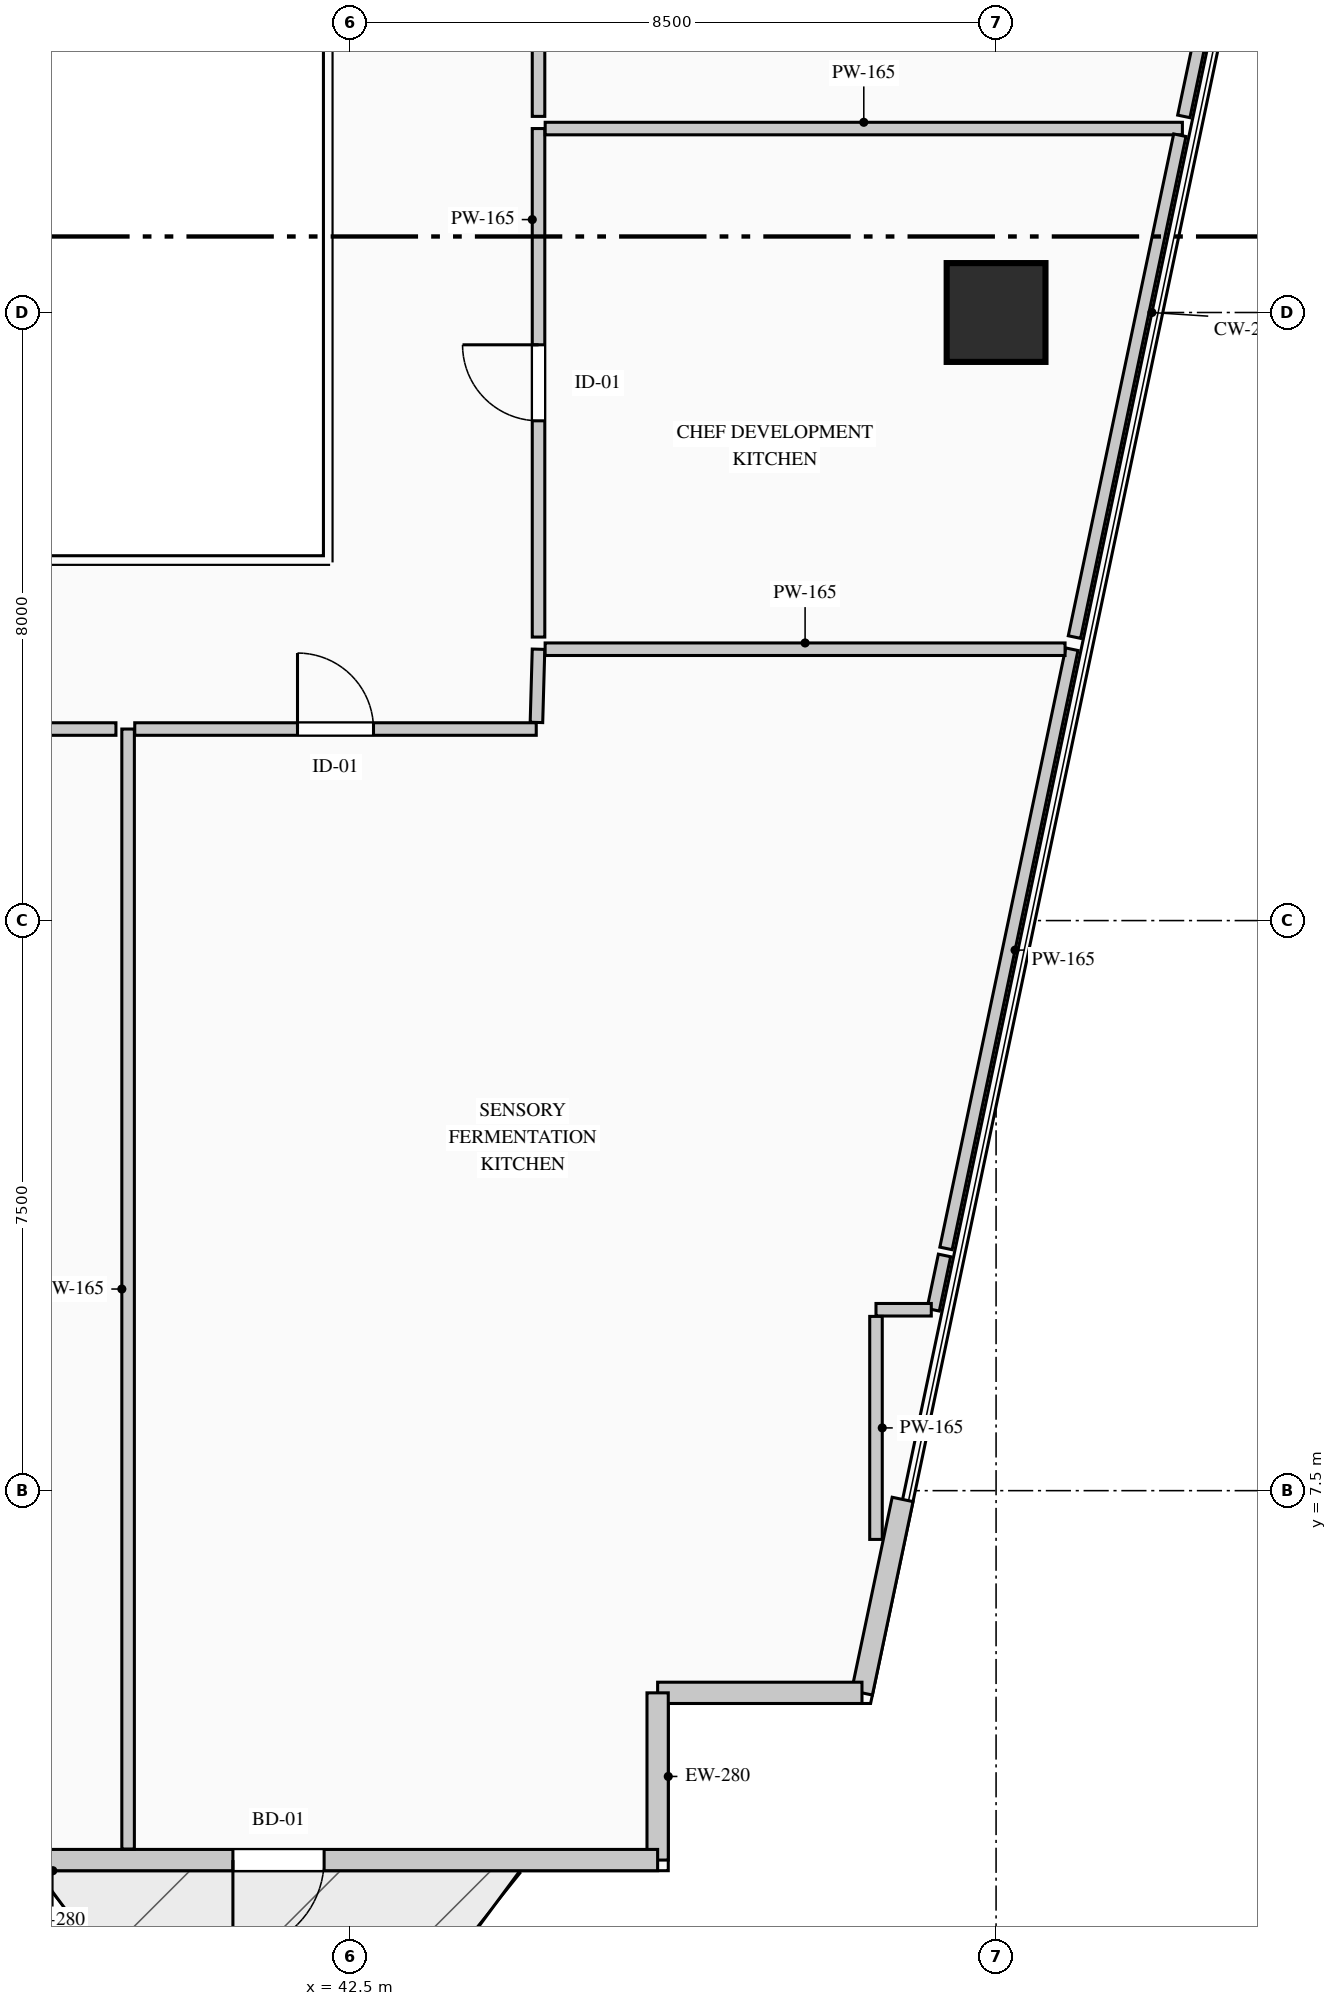
"""IFC4 building model, lengths in metres.
Left out: names, types, materials, properties, quantities, classifications, styles, units other than length and angle.
Written with IfcOpenShell. Run it as: python <this file> out.ifc"""

import sys

from ifc_helpers import new_model, si_unit, direction, frame, frame_2d, origin, origin_2d, place, context, subcontext, project, spatial, rectangle, extrude, element, fill, save


model = new_model("IFC4")
c1 = context("Model", 3, precision=1e-05, world=origin(), true_north=direction((0.0, 1.0)))
c2 = subcontext(c1, "Body", "Model", "MODEL_VIEW")
j1 = project(units=[si_unit("LENGTHUNIT", "METRE"), si_unit("PLANEANGLEUNIT", "RADIAN")], contexts=[c1])
p1 = place(None, origin())
s1 = spatial("IfcSite", under=j1, at=p1, CompositionType="ELEMENT")
p2 = place(p1, origin())
s2 = spatial("IfcBuilding", under=s1, at=p2, CompositionType="ELEMENT")
p3 = place(p2, frame((0.0, 0.0, 84.2)))
s3 = spatial("IfcBuildingStorey", under=s2, at=p3, CompositionType="ELEMENT", Elevation=84.2)
p4 = place(p3, frame((51.0, 23.0, 0.0), z_axis=(0.0, 0.0, 1.0), x_axis=(1.0, 0.0, 0.0)))
e1 = element("IfcColumn", 1, at=p4, inside=s3, PredefinedType="COLUMN", context=c2, shape_type="SweptSolid", body=[
    extrude(rectangle(XDim=1.3, YDim=1.3, at=origin_2d()), origin(), (0.0, 0.0, 1.0), 4.4),
])
p5 = place(p3, frame((49.77, 7.385, 0.0), z_axis=(0.0, 0.0, 1.0), x_axis=(-0.205551409765, -0.978646319128, 0.0)))
e2 = element("IfcWall", 2, at=p5, inside=s3, PredefinedType="STANDARD", context=c2, shape_type="SweptSolid", body=[
    extrude(rectangle(XDim=2.6, YDim=0.28, at=frame_2d((1.3, 0.0))), origin(), (0.0, 0.0, 1.0), 4.115),
])
p6 = place(p3, frame((49.236, 4.84, 0.0), z_axis=(0.0, 0.0, 1.0), x_axis=(-1.0, 0.0, 0.0)))
e3 = element("IfcWall", 3, at=p6, inside=s3, PredefinedType="STANDARD", context=c2, shape_type="SweptSolid", body=[
    extrude(rectangle(XDim=2.688, YDim=0.28, at=frame_2d((1.344, 0.0))), origin(), (0.0, 0.0, 1.0), 4.115),
])
p7 = place(p3, frame((46.547, 4.84, 0.0), z_axis=(0.0, 0.0, 1.0), x_axis=(0.0, -1.0, 0.0)))
e4 = element("IfcWall", 4, at=p7, inside=s3, PredefinedType="STANDARD", context=c2, shape_type="SweptSolid", body=[
    extrude(rectangle(XDim=2.2, YDim=0.28, at=frame_2d((1.1, 0.0))), origin(), (0.0, 0.0, 1.0), 4.115),
])
p8 = place(p3, frame((46.547, 2.64, 0.0), z_axis=(0.0, 0.0, 1.0), x_axis=(-1.0, 0.0, 0.0)))
e5 = element("IfcWall", 5, at=p8, inside=s3, PredefinedType="STANDARD", context=c2, shape_type="SweptSolid", body=[
    extrude(rectangle(XDim=9.977, YDim=0.28, at=frame_2d((4.989, 0.0))), origin(), (0.0, 0.0, 1.0), 4.115),
])
p9 = place(p8, frame((4.388, 0.0, 0.0)))
e6 = element("IfcOpeningElement", 6, at=p9, cuts=e5, PredefinedType="OPENING", context=c2, shape_type="SweptSolid", body=[
    extrude(rectangle(XDim=1.2, YDim=2.2, at=frame_2d((0.6, 1.1))), frame((0.0, 0.15, 0.0), z_axis=(0.0, -1.0, 0.0), x_axis=(1.0, 0.0, 0.0)), (0.0, 0.0, 1.0), 0.3),
])
p10 = place(p3, frame((51.997, 18.57, 0.0), z_axis=(0.0, 0.0, 1.0), x_axis=(-0.205584289858, -0.978639412533, 0.0)))
e7 = element("IfcWall", 7, at=p10, inside=s3, PredefinedType="PARTITIONING", context=c2, shape_type="SweptSolid", body=[
    extrude(rectangle(XDim=8.055, YDim=0.165, at=frame_2d((4.028, 0.0))), origin(), (0.0, 0.0, 1.0), 4.115),
])
p11 = place(p3, frame((50.322, 10.594, 0.0), z_axis=(0.0, 0.0, 1.0), x_axis=(-0.204661980979, -0.978832709681, 0.0)))
e8 = element("IfcWall", 8, at=p11, inside=s3, PredefinedType="PARTITIONING", context=c2, shape_type="SweptSolid", body=[
    extrude(rectangle(XDim=0.73, YDim=0.165, at=frame_2d((0.365, 0.0))), origin(), (0.0, 0.0, 1.0), 4.115),
])
p12 = place(p3, frame((50.148, 9.88, 0.0), z_axis=(0.0, 0.0, 1.0), x_axis=(-1.0, 0.0, 0.0)))
e9 = element("IfcWall", 9, at=p12, inside=s3, PredefinedType="PARTITIONING", context=c2, shape_type="SweptSolid", body=[
    extrude(rectangle(XDim=0.728, YDim=0.165, at=frame_2d((0.364, 0.0))), origin(), (0.0, 0.0, 1.0), 4.115),
])
p13 = place(p3, frame((49.42, 9.792, 0.0), z_axis=(0.0, 0.0, 1.0), x_axis=(0.0, -1.0, 0.0)))
e10 = element("IfcWall", 10, at=p13, inside=s3, PredefinedType="PARTITIONING", context=c2, shape_type="SweptSolid", body=[
    extrude(rectangle(XDim=2.934, YDim=0.165, at=frame_2d((1.467, 0.0))), origin(), (0.0, 0.0, 1.0), 4.115),
])
p14 = place(p3, frame((39.58, 2.785, 0.0), z_axis=(0.0, 0.0, 1.0), x_axis=(0.0, 1.0, 0.0)))
e11 = element("IfcWall", 11, at=p14, inside=s3, PredefinedType="PARTITIONING", context=c2, shape_type="SweptSolid", body=[
    extrude(rectangle(XDim=14.735, YDim=0.165, at=frame_2d((7.368, 0.0))), origin(), (0.0, 0.0, 1.0), 4.115),
])
p15 = place(p3, frame((39.667, 17.52, 0.0), z_axis=(0.0, 0.0, 1.0), x_axis=(1.0, 0.0, 0.0)))
e12 = element("IfcWall", 12, at=p15, inside=s3, PredefinedType="PARTITIONING", context=c2, shape_type="SweptSolid", body=[
    extrude(rectangle(XDim=5.282, YDim=0.165, at=frame_2d((2.641, 0.0))), origin(), (0.0, 0.0, 1.0), 4.115),
])
p16 = place(p15, frame((2.141, 0.0, 0.0)))
e13 = element("IfcOpeningElement", 13, at=p16, cuts=e12, PredefinedType="OPENING", context=c2, shape_type="SweptSolid", body=[
    extrude(rectangle(XDim=1.0, YDim=2.15, at=frame_2d((0.5, 1.075))), frame((0.0, 0.093, 0.0), z_axis=(0.0, -1.0, 0.0), x_axis=(1.0, 0.0, 0.0)), (0.0, 0.0, 1.0), 0.185),
])
p17 = place(p3, frame((44.952, 17.607, 0.0), z_axis=(0.0, 0.0, 1.0), x_axis=(0.028624859452, 0.999590224753, 0.0)))
e14 = element("IfcWall", 14, at=p17, inside=s3, PredefinedType="PARTITIONING", context=c2, shape_type="SweptSolid", body=[
    extrude(rectangle(XDim=0.964, YDim=0.165, at=frame_2d((0.482, 0.0))), origin(), (0.0, 0.0, 1.0), 4.115),
])
p18 = place(p3, frame((45.067, 18.57, 0.0), z_axis=(0.0, 0.0, 1.0), x_axis=(1.0, 0.0, 0.0)))
e15 = element("IfcWall", 15, at=p18, inside=s3, PredefinedType="PARTITIONING", context=c2, shape_type="SweptSolid", body=[
    extrude(rectangle(XDim=6.841, YDim=0.165, at=frame_2d((3.42, 0.0))), origin(), (0.0, 0.0, 1.0), 4.115),
])
p19 = place(p3, frame((28.58, 17.52, 0.0), z_axis=(0.0, 0.0, 1.0), x_axis=(1.0, 0.0, 0.0)))
e16 = element("IfcWall", 16, at=p19, inside=s3, PredefinedType="PARTITIONING", context=c2, shape_type="SweptSolid", body=[
    extrude(rectangle(XDim=10.84, YDim=0.165, at=frame_2d((5.42, 0.0))), origin(), (0.0, 0.0, 1.0), 3.8),
])
p20 = place(p19, frame((4.92, 0.0, 0.0)))
e17 = element("IfcOpeningElement", 17, at=p20, cuts=e16, PredefinedType="OPENING", context=c2, shape_type="SweptSolid", body=[
    extrude(rectangle(XDim=1.0, YDim=2.15, at=frame_2d((0.5, 1.075))), frame((0.0, 0.093, 0.0), z_axis=(0.0, -1.0, 0.0), x_axis=(1.0, 0.0, 0.0)), (0.0, 0.0, 1.0), 0.185),
])
p21 = place(p3, frame((44.98, 18.73, 0.0), z_axis=(0.0, 0.0, 1.0), x_axis=(0.0, 1.0, 0.0)))
e18 = element("IfcWall", 18, at=p21, inside=s3, PredefinedType="PARTITIONING", context=c2, shape_type="SweptSolid", body=[
    extrude(rectangle(XDim=6.69, YDim=0.165, at=frame_2d((3.345, 0.0))), origin(), (0.0, 0.0, 1.0), 4.115),
])
p22 = place(p21, frame((2.845, 0.0, 0.0)))
e19 = element("IfcOpeningElement", 19, at=p22, cuts=e18, PredefinedType="OPENING", context=c2, shape_type="SweptSolid", body=[
    extrude(rectangle(XDim=1.0, YDim=2.15, at=frame_2d((0.5, 1.075))), frame((0.0, 0.093, 0.0), z_axis=(0.0, -1.0, 0.0), x_axis=(1.0, 0.0, 0.0)), (0.0, 0.0, 1.0), 0.185),
])
p23 = place(p3, frame((45.067, 25.42, 0.0), z_axis=(0.0, 0.0, 1.0), x_axis=(1.0, 0.0, 0.0)))
e20 = element("IfcWall", 20, at=p23, inside=s3, PredefinedType="PARTITIONING", context=c2, shape_type="SweptSolid", body=[
    extrude(rectangle(XDim=8.384, YDim=0.165, at=frame_2d((4.192, 0.0))), origin(), (0.0, 0.0, 1.0), 4.115),
])
p24 = place(p3, frame((53.417, 25.333, 0.0), z_axis=(0.0, 0.0, 1.0), x_axis=(-0.205508916106, -0.978655243383, 0.0)))
e21 = element("IfcWall", 21, at=p24, inside=s3, PredefinedType="PARTITIONING", context=c2, shape_type="SweptSolid", body=[
    extrude(rectangle(XDim=6.747, YDim=0.165, at=frame_2d((3.373, 0.0))), origin(), (0.0, 0.0, 1.0), 4.115),
])
p25 = place(p3, frame((56.194, 38.548, 0.0), z_axis=(0.0, 0.0, 1.0), x_axis=(-0.205602819639, -0.978635519771, 0.0)))
e22 = element("IfcWall", 22, at=p25, inside=s3, PredefinedType="PARTITIONING", context=c2, shape_type="SweptSolid", body=[
    extrude(rectangle(XDim=13.251, YDim=0.165, at=frame_2d((6.625, 0.0))), origin(), (0.0, 0.0, 1.0), 4.115),
])
p26 = place(p3, frame((44.98, 25.58, 0.0), z_axis=(0.0, 0.0, 1.0), x_axis=(0.0, 1.0, 0.0)))
e23 = element("IfcWall", 23, at=p26, inside=s3, PredefinedType="PARTITIONING", context=c2, shape_type="SweptSolid", body=[
    extrude(rectangle(XDim=8.45, YDim=0.165, at=frame_2d((4.225, 0.0))), origin(), (0.0, 0.0, 1.0), 3.8),
])
p27 = place(p26, frame((3.725, 0.0, 0.0)))
e24 = element("IfcOpeningElement", 24, at=p27, cuts=e23, PredefinedType="OPENING", context=c2, shape_type="SweptSolid", body=[
    extrude(rectangle(XDim=1.0, YDim=2.15, at=frame_2d((0.5, 1.075))), frame((0.0, 0.093, 0.0), z_axis=(0.0, -1.0, 0.0), x_axis=(1.0, 0.0, 0.0)), (0.0, 0.0, 1.0), 0.185),
])
p28 = place(p9, origin())
e25 = element("IfcDoor", 25, at=p28, inside=s3, OperationType="SINGLE_SWING_RIGHT", PredefinedType="DOOR", context=c2, shape_type="SweptSolid", body=[
    extrude(rectangle(XDim=1.2, YDim=2.2, at=frame_2d((0.6, 1.1))), frame((0.0, 0.025, 0.0), z_axis=(0.0, -1.0, 0.0), x_axis=(1.0, 0.0, 0.0)), (0.0, 0.0, 1.0), 0.05),
])
fill(e6, e25)
p29 = place(p16, origin())
e26 = element("IfcDoor", 26, at=p29, inside=s3, OperationType="SINGLE_SWING_LEFT", PredefinedType="DOOR", context=c2, shape_type="SweptSolid", body=[
    extrude(rectangle(XDim=1.0, YDim=2.15, at=frame_2d((0.5, 1.075))), frame((0.0, 0.025, 0.0), z_axis=(0.0, -1.0, 0.0), x_axis=(1.0, 0.0, 0.0)), (0.0, 0.0, 1.0), 0.05),
])
fill(e13, e26)
p30 = place(p22, origin())
e27 = element("IfcDoor", 27, at=p30, inside=s3, OperationType="SINGLE_SWING_RIGHT", PredefinedType="DOOR", context=c2, shape_type="SweptSolid", body=[
    extrude(rectangle(XDim=1.0, YDim=2.15, at=frame_2d((0.5, 1.075))), frame((0.0, 0.025, 0.0), z_axis=(0.0, -1.0, 0.0), x_axis=(1.0, 0.0, 0.0)), (0.0, 0.0, 1.0), 0.05),
])
fill(e19, e27)
save(model, sys.argv[1])
